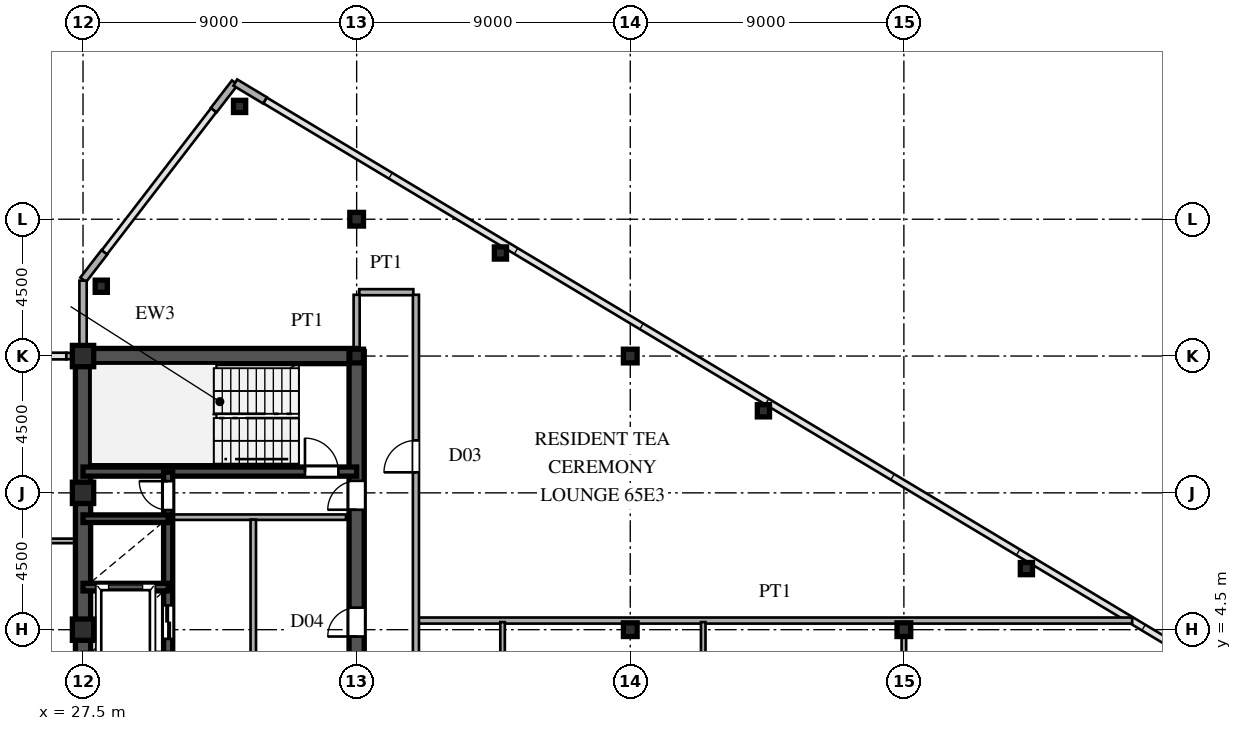
"""IFC4 building model, lengths in metres.
Left out: names, types, materials, properties, quantities, classifications, styles, units other than length and angle.
Written with IfcOpenShell. Run it as: python <this file> out.ifc"""

import sys

from ifc_helpers import new_model, si_unit, direction, frame, frame_2d, origin, origin_2d, place, context, subcontext, project, spatial, rectangle, hollow_rectangle, i_section, extrude, source, transform, mapped, element, fill, save


model = new_model("IFC4")
c1 = context("Model", 3, precision=1e-05, world=origin(), true_north=direction((0.0, 1.0)))
c2 = subcontext(c1, "Body", "Model", "MODEL_VIEW")
j1 = project(units=[si_unit("LENGTHUNIT", "METRE"), si_unit("PLANEANGLEUNIT", "RADIAN")], contexts=[c1])
p1 = place(None, origin())
s1 = spatial("IfcSite", under=j1, at=p1, CompositionType="ELEMENT")
p2 = place(p1, origin())
s2 = spatial("IfcBuilding", under=s1, at=p2, CompositionType="ELEMENT")
p3 = place(p2, frame((0.0, 0.0, 246.9)))
s3 = spatial("IfcBuildingStorey", under=s2, at=p3, CompositionType="ELEMENT", Elevation=246.9)
m1 = source(origin(), c2, "Body", "SweptSolid", [
    extrude(hollow_rectangle(XDim=0.7, YDim=0.7, WallThickness=0.03, at=origin_2d()), origin(), (0.0, 0.0, 1.0), 3.75),
])
for number, where, z_axis, x_axis in (
    (1, (27.5, 4.5, 0.0), (0.0, 0.0, 1.0), (1.0, 0.0, 0.0)),
    (2, (27.5, 9.0, 0.0), (0.0, 0.0, 1.0), (1.0, 0.0, 0.0)),
    (3, (27.5, 13.5, 0.0), (0.0, 0.0, 1.0), (1.0, 0.0, 0.0)),
):
    element("IfcColumn", number, at=place(p3, frame(where, z_axis=z_axis, x_axis=x_axis)), inside=s3, PredefinedType="COLUMN", context=c2, shape_type="MappedRepresentation", body=[
        mapped(m1, transform((0.0, 0.0, 0.0), scale=1.0)),
    ])
m2 = source(origin(), c2, "Body", "SweptSolid", [
    extrude(i_section(OverallWidth=0.45, OverallDepth=0.45, WebThickness=0.016, FlangeThickness=0.025, at=origin_2d()), origin(), (0.0, 0.0, 1.0), 3.75),
])
for number, where, z_axis, x_axis in (
    (4, (36.5, 13.5, 0.0), (0.0, 0.0, 1.0), (1.0, 0.0, 0.0)),
    (5, (36.5, 18.0, 0.0), (0.0, 0.0, 1.0), (1.0, 0.0, 0.0)),
    (6, (45.5, 4.5, 0.0), (0.0, 0.0, 1.0), (1.0, 0.0, 0.0)),
    (7, (45.5, 13.5, 0.0), (0.0, 0.0, 1.0), (1.0, 0.0, 0.0)),
    (8, (54.5, 4.5, 0.0), (0.0, 0.0, 1.0), (1.0, 0.0, 0.0)),
):
    element("IfcColumn", number, at=place(p3, frame(where, z_axis=z_axis, x_axis=x_axis)), inside=s3, PredefinedType="COLUMN", context=c2, shape_type="MappedRepresentation", body=[
        mapped(m2, transform((0.0, 0.0, 0.0), scale=1.0)),
    ])
m3 = source(origin(), c2, "Body", "SweptSolid", [
    extrude(hollow_rectangle(XDim=0.4, YDim=0.4, WallThickness=0.016, at=origin_2d()), origin(), (0.0, 0.0, 1.0), 3.75),
])
for number, where, z_axis, x_axis in (
    (9, (32.65, 21.71, 0.0), (0.0, 0.0, 1.0), (1.0, 0.0, 0.0)),
    (10, (28.1, 15.796, 0.0), (0.0, 0.0, 1.0), (1.0, 0.0, 0.0)),
    (11, (41.23, 16.889, 0.0), (0.0, 0.0, 1.0), (1.0, 0.0, 0.0)),
    (12, (49.88, 11.699, 0.0), (0.0, 0.0, 1.0), (1.0, 0.0, 0.0)),
    (13, (58.53, 6.509, 0.0), (0.0, 0.0, 1.0), (1.0, 0.0, 0.0)),
):
    element("IfcColumn", number, at=place(p3, frame(where, z_axis=z_axis, x_axis=x_axis)), inside=s3, PredefinedType="COLUMN", context=c2, shape_type="MappedRepresentation", body=[
        mapped(m3, transform((0.0, 0.0, 0.0), scale=1.0)),
    ])
for number, where, z_axis, x_axis in (
    (14, (33.486, 21.908, 0.0), (0.0, 0.0, 1.0), (-0.857, 0.515, 0.0)),
    (15, (32.494, 22.492, 0.0), (0.0, 0.0, 1.0), (-0.61, -0.793, 0.0)),
    (16, (28.201, 16.912, 0.0), (0.0, 0.0, 1.0), (-0.61, -0.793, 0.0)),
):
    element("IfcWall", number, at=place(p3, frame(where, z_axis=z_axis, x_axis=x_axis)), inside=s3, PredefinedType="SOLIDWALL", context=c2, shape_type="SweptSolid", body=[
        extrude(rectangle(XDim=1.14, YDim=0.24, at=frame_2d((0.57, 0.0))), origin(), (0.0, 0.0, 1.0), 3.53),
    ])
p4 = place(p3, frame((27.5, 13.755, 0.0), z_axis=(0.0, 0.0, 1.0), x_axis=(0.0, 1.0, 0.0)))
e17 = element("IfcWall", 17, at=p4, inside=s3, PredefinedType="SOLIDWALL", context=c2, shape_type="SweptSolid", body=[
    extrude(rectangle(XDim=0.62, YDim=0.24, at=frame_2d((0.31, 0.0))), origin(), (0.0, 0.0, 1.0), 3.03),
])
p5 = place(p3, frame((27.5, 14.375, 0.0), z_axis=(0.0, 0.0, 1.0), x_axis=(0.0, 1.0, 0.0)))
e18 = element("IfcWall", 18, at=p5, inside=s3, PredefinedType="SOLIDWALL", context=c2, shape_type="SweptSolid", body=[
    extrude(rectangle(XDim=1.605, YDim=0.24, at=frame_2d((0.803, 0.0))), origin(), (0.0, 0.0, 1.0), 3.53),
])
p6 = place(p3, frame((26.95, 13.5, 0.0), z_axis=(0.0, 0.0, 1.0), x_axis=(1.0, 0.0, 0.0)))
e19 = element("IfcWall", 19, at=p6, inside=s3, PredefinedType="SOLIDWALL", context=c2, shape_type="SweptSolid", body=[
    extrude(rectangle(XDim=0.54, YDim=0.21, at=frame_2d((0.27, 0.0))), origin(), (0.0, 0.0, 1.0), 3.03),
])
p7 = place(p3, frame((27.5, 1.3, 0.0), z_axis=(0.0, 0.0, 1.0), x_axis=(0.0, 1.0, 0.0)))
e20 = element("IfcWall", 20, at=p7, inside=s3, PredefinedType="SHEAR", context=c2, shape_type="SweptSolid", body=[
    extrude(rectangle(XDim=12.2, YDim=0.5, at=frame_2d((6.1, 0.0))), origin(), (0.0, 0.0, 1.0), 3.53),
])
p8 = place(p3, frame((27.5, 13.5, 0.0), z_axis=(0.0, 0.0, 1.0), x_axis=(1.0, 0.0, 0.0)))
e21 = element("IfcWall", 21, at=p8, inside=s3, PredefinedType="SHEAR", context=c2, shape_type="SweptSolid", body=[
    extrude(rectangle(XDim=9.0, YDim=0.5, at=frame_2d((4.5, 0.0))), origin(), (0.0, 0.0, 1.0), 3.53),
])
p9 = place(p3, frame((36.5, 8.2, 0.0), z_axis=(0.0, 0.0, 1.0), x_axis=(0.0, 1.0, 0.0)))
e22 = element("IfcWall", 22, at=p9, inside=s3, PredefinedType="SHEAR", context=c2, shape_type="SweptSolid", body=[
    extrude(rectangle(XDim=5.45, YDim=0.5, at=frame_2d((2.725, 0.0))), origin(), (0.0, 0.0, 1.0), 3.53),
])
p10 = place(p9, frame((0.245, 0.0, 0.0)))
e23 = element("IfcOpeningElement", 23, at=p10, cuts=e22, PredefinedType="OPENING", context=c2, shape_type="SweptSolid", body=[
    extrude(rectangle(XDim=0.95, YDim=2.15, at=frame_2d((0.475, 1.075))), frame((0.0, 0.26, 0.0), z_axis=(0.0, -1.0, 0.0), x_axis=(1.0, 0.0, 0.0)), (0.0, 0.0, 1.0), 0.52),
])
p11 = place(p3, frame((36.5, 1.3, 0.0), z_axis=(0.0, 0.0, 1.0), x_axis=(0.0, 1.0, 0.0)))
e24 = element("IfcWall", 24, at=p11, inside=s3, PredefinedType="SHEAR", context=c2, shape_type="SweptSolid", body=[
    extrude(rectangle(XDim=6.9, YDim=0.5, at=frame_2d((3.45, 0.0))), origin(), (0.0, 0.0, 1.0), 3.53),
])
p12 = place(p11, frame((2.975, 0.0, 0.0)))
e25 = element("IfcOpeningElement", 25, at=p12, cuts=e24, PredefinedType="OPENING", context=c2, shape_type="SweptSolid", body=[
    extrude(rectangle(XDim=0.95, YDim=2.15, at=frame_2d((0.475, 1.075))), frame((0.0, 0.26, 0.0), z_axis=(0.0, -1.0, 0.0), x_axis=(1.0, 0.0, 0.0)), (0.0, 0.0, 1.0), 0.52),
])
p13 = place(p3, frame((27.5, 9.7, 0.0), z_axis=(0.0, 0.0, 1.0), x_axis=(1.0, 0.0, 0.0)))
e26 = element("IfcWall", 26, at=p13, inside=s3, PredefinedType="SHEAR", context=c2, shape_type="SweptSolid", body=[
    extrude(rectangle(XDim=9.0, YDim=0.3, at=frame_2d((4.5, 0.0))), origin(), (0.0, 0.0, 1.0), 3.53),
])
p14 = place(p13, frame((7.3, 0.0, 0.0)))
e27 = element("IfcOpeningElement", 27, at=p14, cuts=e26, PredefinedType="OPENING", context=c2, shape_type="SweptSolid", body=[
    extrude(rectangle(XDim=1.1, YDim=2.2, at=frame_2d((0.55, 1.1))), frame((0.0, 0.16, 0.0), z_axis=(0.0, -1.0, 0.0), x_axis=(1.0, 0.0, 0.0)), (0.0, 0.0, 1.0), 0.32),
])
for number, where, z_axis, x_axis in (
    (28, (27.5, 5.9, 0.0), (0.0, 0.0, 1.0), (1.0, 0.0, 0.0)),
    (29, (27.5, 8.15, 0.0), (0.0, 0.0, 1.0), (1.0, 0.0, 0.0)),
):
    element("IfcWall", number, at=place(p3, frame(where, z_axis=z_axis, x_axis=x_axis)), inside=s3, PredefinedType="SHEAR", context=c2, shape_type="SweptSolid", body=[
        extrude(rectangle(XDim=2.8, YDim=0.25, at=frame_2d((1.4, 0.0))), origin(), (0.0, 0.0, 1.0), 3.53),
    ])
p15 = place(p3, frame((30.3, 3.6, 0.0), z_axis=(0.0, 0.0, 1.0), x_axis=(0.0, 1.0, 0.0)))
e30 = element("IfcWall", 30, at=p15, inside=s3, PredefinedType="SHEAR", context=c2, shape_type="SweptSolid", body=[
    extrude(rectangle(XDim=2.3, YDim=0.3, at=frame_2d((1.15, 0.0))), origin(), (0.0, 0.0, 1.0), 3.53),
])
p16 = place(p15, frame((0.6, 0.0, 0.0)))
e31 = element("IfcOpeningElement", 31, at=p16, cuts=e30, PredefinedType="OPENING", context=c2, shape_type="SweptSolid", body=[
    extrude(rectangle(XDim=1.1, YDim=2.2, at=frame_2d((0.55, 1.1))), frame((0.0, 0.16, 0.0), z_axis=(0.0, -1.0, 0.0), x_axis=(1.0, 0.0, 0.0)), (0.0, 0.0, 1.0), 0.32),
])
p17 = place(p3, frame((30.3, 5.9, 0.0), z_axis=(0.0, 0.0, 1.0), x_axis=(0.0, 1.0, 0.0)))
e32 = element("IfcWall", 32, at=p17, inside=s3, PredefinedType="SHEAR", context=c2, shape_type="SweptSolid", body=[
    extrude(rectangle(XDim=2.25, YDim=0.3, at=frame_2d((1.125, 0.0))), origin(), (0.0, 0.0, 1.0), 3.53),
])
p18 = place(p3, frame((30.3, 8.15, 0.0), z_axis=(0.0, 0.0, 1.0), x_axis=(0.0, 1.0, 0.0)))
e33 = element("IfcWall", 33, at=p18, inside=s3, PredefinedType="SHEAR", context=c2, shape_type="SweptSolid", body=[
    extrude(rectangle(XDim=1.53, YDim=0.3, at=frame_2d((0.765, 0.0))), origin(), (0.0, 0.0, 1.0), 3.53),
])
p19 = place(p18, frame((0.285, 0.0, 0.0)))
e34 = element("IfcOpeningElement", 34, at=p19, cuts=e33, PredefinedType="OPENING", context=c2, shape_type="SweptSolid", body=[
    extrude(rectangle(XDim=0.95, YDim=2.15, at=frame_2d((0.475, 1.075))), frame((0.0, 0.16, 0.0), z_axis=(0.0, -1.0, 0.0), x_axis=(1.0, 0.0, 0.0)), (0.0, 0.0, 1.0), 0.32),
])
p20 = place(p3, frame((30.45, 8.2, 0.0), z_axis=(0.0, 0.0, 1.0), x_axis=(1.0, 0.0, 0.0)))
e35 = element("IfcWall", 35, at=p20, inside=s3, PredefinedType="PARTITIONING", context=c2, shape_type="SweptSolid", body=[
    extrude(rectangle(XDim=5.7, YDim=0.18, at=frame_2d((2.85, 0.0))), origin(), (0.0, 0.0, 1.0), 3.53),
])
p21 = place(p3, frame((33.1, 1.38, 0.0), z_axis=(0.0, 0.0, 1.0), x_axis=(0.0, 1.0, 0.0)))
e36 = element("IfcWall", 36, at=p21, inside=s3, PredefinedType="PARTITIONING", context=c2, shape_type="SweptSolid", body=[
    extrude(rectangle(XDim=6.74, YDim=0.18, at=frame_2d((3.37, 0.0))), origin(), (0.0, 0.0, 1.0), 3.53),
])
p22 = place(p3, frame((38.53, 4.8, 0.0), z_axis=(0.0, 0.0, 1.0), x_axis=(1.0, 0.0, 0.0)))
e37 = element("IfcWall", 37, at=p22, inside=s3, PredefinedType="PARTITIONING", context=c2, shape_type="SweptSolid", body=[
    extrude(rectangle(XDim=23.48, YDim=0.2, at=frame_2d((11.74, 0.0))), origin(), (0.0, 0.0, 1.0), 3.53),
])
p23 = place(p3, frame((7.085, 7.42, 0.0), z_axis=(0.0, 0.0, 1.0), x_axis=(1.0, 0.0, 0.0)))
e38 = element("IfcWall", 38, at=p23, inside=s3, PredefinedType="PARTITIONING", context=c2, shape_type="SweptSolid", body=[
    extrude(rectangle(XDim=20.16, YDim=0.15, at=frame_2d((10.08, 0.0))), origin(), (0.0, 0.0, 1.0), 3.53),
])
p24 = place(p23, frame((3.44, 0.0, 0.0)))
e39 = element("IfcOpeningElement", 39, at=p24, cuts=e38, PredefinedType="OPENING", context=c2, shape_type="SweptSolid", body=[
    extrude(rectangle(XDim=0.95, YDim=2.15, at=frame_2d((0.475, 1.075))), frame((0.0, 0.085, 0.0), z_axis=(0.0, -1.0, 0.0), x_axis=(1.0, 0.0, 0.0)), (0.0, 0.0, 1.0), 0.17),
])
p25 = place(p23, frame((10.69, 0.0, 0.0)))
e40 = element("IfcOpeningElement", 40, at=p25, cuts=e38, PredefinedType="OPENING", context=c2, shape_type="SweptSolid", body=[
    extrude(rectangle(XDim=0.95, YDim=2.15, at=frame_2d((0.475, 1.075))), frame((0.0, 0.085, 0.0), z_axis=(0.0, -1.0, 0.0), x_axis=(1.0, 0.0, 0.0)), (0.0, 0.0, 1.0), 0.17),
])
p26 = place(p23, frame((16.94, 0.0, 0.0)))
e41 = element("IfcOpeningElement", 41, at=p26, cuts=e38, PredefinedType="OPENING", context=c2, shape_type="SweptSolid", body=[
    extrude(rectangle(XDim=0.95, YDim=2.15, at=frame_2d((0.475, 1.075))), frame((0.0, 0.085, 0.0), z_axis=(0.0, -1.0, 0.0), x_axis=(1.0, 0.0, 0.0)), (0.0, 0.0, 1.0), 0.17),
])
p27 = place(p3, frame((36.585, 15.6, 0.0), z_axis=(0.0, 0.0, 1.0), x_axis=(1.0, 0.0, 0.0)))
e42 = element("IfcWall", 42, at=p27, inside=s3, PredefinedType="PARTITIONING", context=c2, shape_type="SweptSolid", body=[
    extrude(rectangle(XDim=1.78, YDim=0.2, at=frame_2d((0.89, 0.0))), origin(), (0.0, 0.0, 1.0), 3.53),
])
p28 = place(p3, frame((36.5, 13.755, 0.0), z_axis=(0.0, 0.0, 1.0), x_axis=(0.0, 1.0, 0.0)))
e43 = element("IfcWall", 43, at=p28, inside=s3, PredefinedType="PARTITIONING", context=c2, shape_type="SweptSolid", body=[
    extrude(rectangle(XDim=1.76, YDim=0.2, at=frame_2d((0.88, 0.0))), origin(), (0.0, 0.0, 1.0), 2.93),
])
p29 = place(p3, frame((38.45, -15.515, 0.0), z_axis=(0.0, 0.0, 1.0), x_axis=(0.0, 1.0, 0.0)))
e44 = element("IfcWall", 44, at=p29, inside=s3, PredefinedType="PARTITIONING", context=c2, shape_type="SweptSolid", body=[
    extrude(rectangle(XDim=31.03, YDim=0.2, at=frame_2d((15.515, 0.0))), origin(), (0.0, 0.0, 1.0), 3.53),
])
p30 = place(p29, frame((3.09, 0.0, 0.0)))
e45 = element("IfcOpeningElement", 45, at=p30, cuts=e44, PredefinedType="OPENING", context=c2, shape_type="SweptSolid", body=[
    extrude(rectangle(XDim=1.05, YDim=2.25, at=frame_2d((0.525, 1.125))), frame((0.0, 0.11, 0.0), z_axis=(0.0, -1.0, 0.0), x_axis=(1.0, 0.0, 0.0)), (0.0, 0.0, 1.0), 0.22),
])
p31 = place(p29, frame((13.095, 0.0, 0.0)))
e46 = element("IfcOpeningElement", 46, at=p31, cuts=e44, PredefinedType="OPENING", context=c2, shape_type="SweptSolid", body=[
    extrude(rectangle(XDim=1.05, YDim=2.25, at=frame_2d((0.525, 1.125))), frame((0.0, 0.11, 0.0), z_axis=(0.0, -1.0, 0.0), x_axis=(1.0, 0.0, 0.0)), (0.0, 0.0, 1.0), 0.22),
])
p32 = place(p29, frame((25.19, 0.0, 0.0)))
e47 = element("IfcOpeningElement", 47, at=p32, cuts=e44, PredefinedType="OPENING", context=c2, shape_type="SweptSolid", body=[
    extrude(rectangle(XDim=1.05, YDim=2.25, at=frame_2d((0.525, 1.125))), frame((0.0, 0.11, 0.0), z_axis=(0.0, -1.0, 0.0), x_axis=(1.0, 0.0, 0.0)), (0.0, 0.0, 1.0), 0.22),
])
p33 = place(p3, frame((41.3, 0.952, 0.0), z_axis=(0.0, 0.0, 1.0), x_axis=(0.0, 1.0, 0.0)))
e48 = element("IfcWall", 48, at=p33, inside=s3, PredefinedType="PARTITIONING", context=c2, shape_type="SweptSolid", body=[
    extrude(rectangle(XDim=3.798, YDim=0.15, at=frame_2d((1.899, 0.0))), origin(), (0.0, 0.0, 1.0), 3.53),
])
p34 = place(p3, frame((47.9, -8.15, 0.0), z_axis=(0.0, 0.0, 1.0), x_axis=(0.0, 1.0, 0.0)))
e49 = element("IfcWall", 49, at=p34, inside=s3, PredefinedType="PARTITIONING", context=c2, shape_type="SweptSolid", body=[
    extrude(rectangle(XDim=12.9, YDim=0.15, at=frame_2d((6.45, 0.0))), origin(), (0.0, 0.0, 1.0), 3.53),
])
p35 = place(p34, frame((5.975, 0.0, 0.0)))
e50 = element("IfcOpeningElement", 50, at=p35, cuts=e49, PredefinedType="OPENING", context=c2, shape_type="SweptSolid", body=[
    extrude(rectangle(XDim=0.95, YDim=2.15, at=frame_2d((0.475, 1.075))), frame((0.0, 0.085, 0.0), z_axis=(0.0, -1.0, 0.0), x_axis=(1.0, 0.0, 0.0)), (0.0, 0.0, 1.0), 0.17),
])
p36 = place(p34, frame((1.642, 0.0, 0.0)))
e51 = element("IfcOpeningElement", 51, at=p36, cuts=e49, PredefinedType="OPENING", context=c2, shape_type="SweptSolid", body=[
    extrude(rectangle(XDim=0.95, YDim=2.15, at=frame_2d((0.475, 1.075))), frame((0.0, 0.085, 0.0), z_axis=(0.0, -1.0, 0.0), x_axis=(1.0, 0.0, 0.0)), (0.0, 0.0, 1.0), 0.17),
])
p37 = place(p3, frame((54.5, -8.15, 0.0), z_axis=(0.0, 0.0, 1.0), x_axis=(0.0, 1.0, 0.0)))
e52 = element("IfcWall", 52, at=p37, inside=s3, PredefinedType="PARTITIONING", context=c2, shape_type="SweptSolid", body=[
    extrude(rectangle(XDim=12.9, YDim=0.15, at=frame_2d((6.45, 0.0))), origin(), (0.0, 0.0, 1.0), 2.93),
])
p38 = place(p37, frame((5.975, 0.0, 0.0)))
e53 = element("IfcOpeningElement", 53, at=p38, cuts=e52, PredefinedType="OPENING", context=c2, shape_type="SweptSolid", body=[
    extrude(rectangle(XDim=0.95, YDim=2.15, at=frame_2d((0.475, 1.075))), frame((0.0, 0.085, 0.0), z_axis=(0.0, -1.0, 0.0), x_axis=(1.0, 0.0, 0.0)), (0.0, 0.0, 1.0), 0.17),
])
p39 = place(p37, frame((1.642, 0.0, 0.0)))
e54 = element("IfcOpeningElement", 54, at=p39, cuts=e52, PredefinedType="OPENING", context=c2, shape_type="SweptSolid", body=[
    extrude(rectangle(XDim=0.95, YDim=2.15, at=frame_2d((0.475, 1.075))), frame((0.0, 0.085, 0.0), z_axis=(0.0, -1.0, 0.0), x_axis=(1.0, 0.0, 0.0)), (0.0, 0.0, 1.0), 0.17),
])
p40 = place(p37, frame((10.308, 0.0, 0.0)))
e55 = element("IfcOpeningElement", 55, at=p40, cuts=e52, PredefinedType="OPENING", context=c2, shape_type="SweptSolid", body=[
    extrude(rectangle(XDim=0.95, YDim=2.15, at=frame_2d((0.475, 1.075))), frame((0.0, 0.085, 0.0), z_axis=(0.0, -1.0, 0.0), x_axis=(1.0, 0.0, 0.0)), (0.0, 0.0, 1.0), 0.17),
])
m4 = source(origin(), c2, "Body", "SweptSolid", [
    extrude(rectangle(XDim=0.95, YDim=2.15, at=frame_2d((0.475, 1.075))), frame((0.0, 0.025, 0.0), z_axis=(0.0, -1.0, 0.0), x_axis=(1.0, 0.0, 0.0)), (0.0, 0.0, 1.0), 0.05),
])
p41 = place(p10, origin())
e56 = element("IfcDoor", 56, at=p41, inside=s3, OperationType="SINGLE_SWING_LEFT", PredefinedType="DOOR", context=c2, shape_type="MappedRepresentation", body=[
    mapped(m4, transform((0.0, 0.0, 0.0), scale=1.0)),
])
fill(e23, e56)
p42 = place(p12, origin())
e57 = element("IfcDoor", 57, at=p42, inside=s3, OperationType="SINGLE_SWING_LEFT", PredefinedType="DOOR", context=c2, shape_type="MappedRepresentation", body=[
    mapped(m4, transform((0.0, 0.0, 0.0), scale=1.0)),
])
fill(e25, e57)
m5 = source(origin(), c2, "Body", "SweptSolid", [
    extrude(rectangle(XDim=1.1, YDim=2.2, at=frame_2d((0.55, 1.1))), frame((0.0, 0.025, 0.0), z_axis=(0.0, -1.0, 0.0), x_axis=(1.0, 0.0, 0.0)), (0.0, 0.0, 1.0), 0.05),
])
p43 = place(p14, origin())
e58 = element("IfcDoor", 58, at=p43, inside=s3, OperationType="SINGLE_SWING_LEFT", PredefinedType="DOOR", context=c2, shape_type="MappedRepresentation", body=[
    mapped(m5, transform((0.0, 0.0, 0.0), scale=1.0)),
])
fill(e27, e58)
m6 = source(origin(), c2, "Body", "SweptSolid", [
    extrude(rectangle(XDim=1.1, YDim=2.2, at=frame_2d((0.55, 1.1))), frame((0.0, 0.025, 0.0), z_axis=(0.0, -1.0, 0.0), x_axis=(1.0, 0.0, 0.0)), (0.0, 0.0, 1.0), 0.05),
])
p44 = place(p16, origin())
e59 = element("IfcDoor", 59, at=p44, inside=s3, OperationType="DOUBLE_DOOR_SLIDING", PredefinedType="DOOR", context=c2, shape_type="MappedRepresentation", body=[
    mapped(m6, transform((0.0, 0.0, 0.0), scale=1.0)),
])
fill(e31, e59)
p45 = place(p19, origin())
e60 = element("IfcDoor", 60, at=p45, inside=s3, OperationType="SINGLE_SWING_RIGHT", PredefinedType="DOOR", context=c2, shape_type="MappedRepresentation", body=[
    mapped(m4, transform((0.0, 0.0, 0.0), scale=1.0)),
])
fill(e34, e60)
m7 = source(origin(), c2, "Body", "SweptSolid", [
    extrude(rectangle(XDim=1.05, YDim=2.25, at=frame_2d((0.525, 1.125))), frame((0.0, 0.025, 0.0), z_axis=(0.0, -1.0, 0.0), x_axis=(1.0, 0.0, 0.0)), (0.0, 0.0, 1.0), 0.05),
])
p46 = place(p32, origin())
e61 = element("IfcDoor", 61, at=p46, inside=s3, OperationType="SINGLE_SWING_LEFT", PredefinedType="DOOR", context=c2, shape_type="MappedRepresentation", body=[
    mapped(m7, transform((0.0, 0.0, 0.0), scale=1.0)),
])
fill(e47, e61)
save(model, sys.argv[1])
